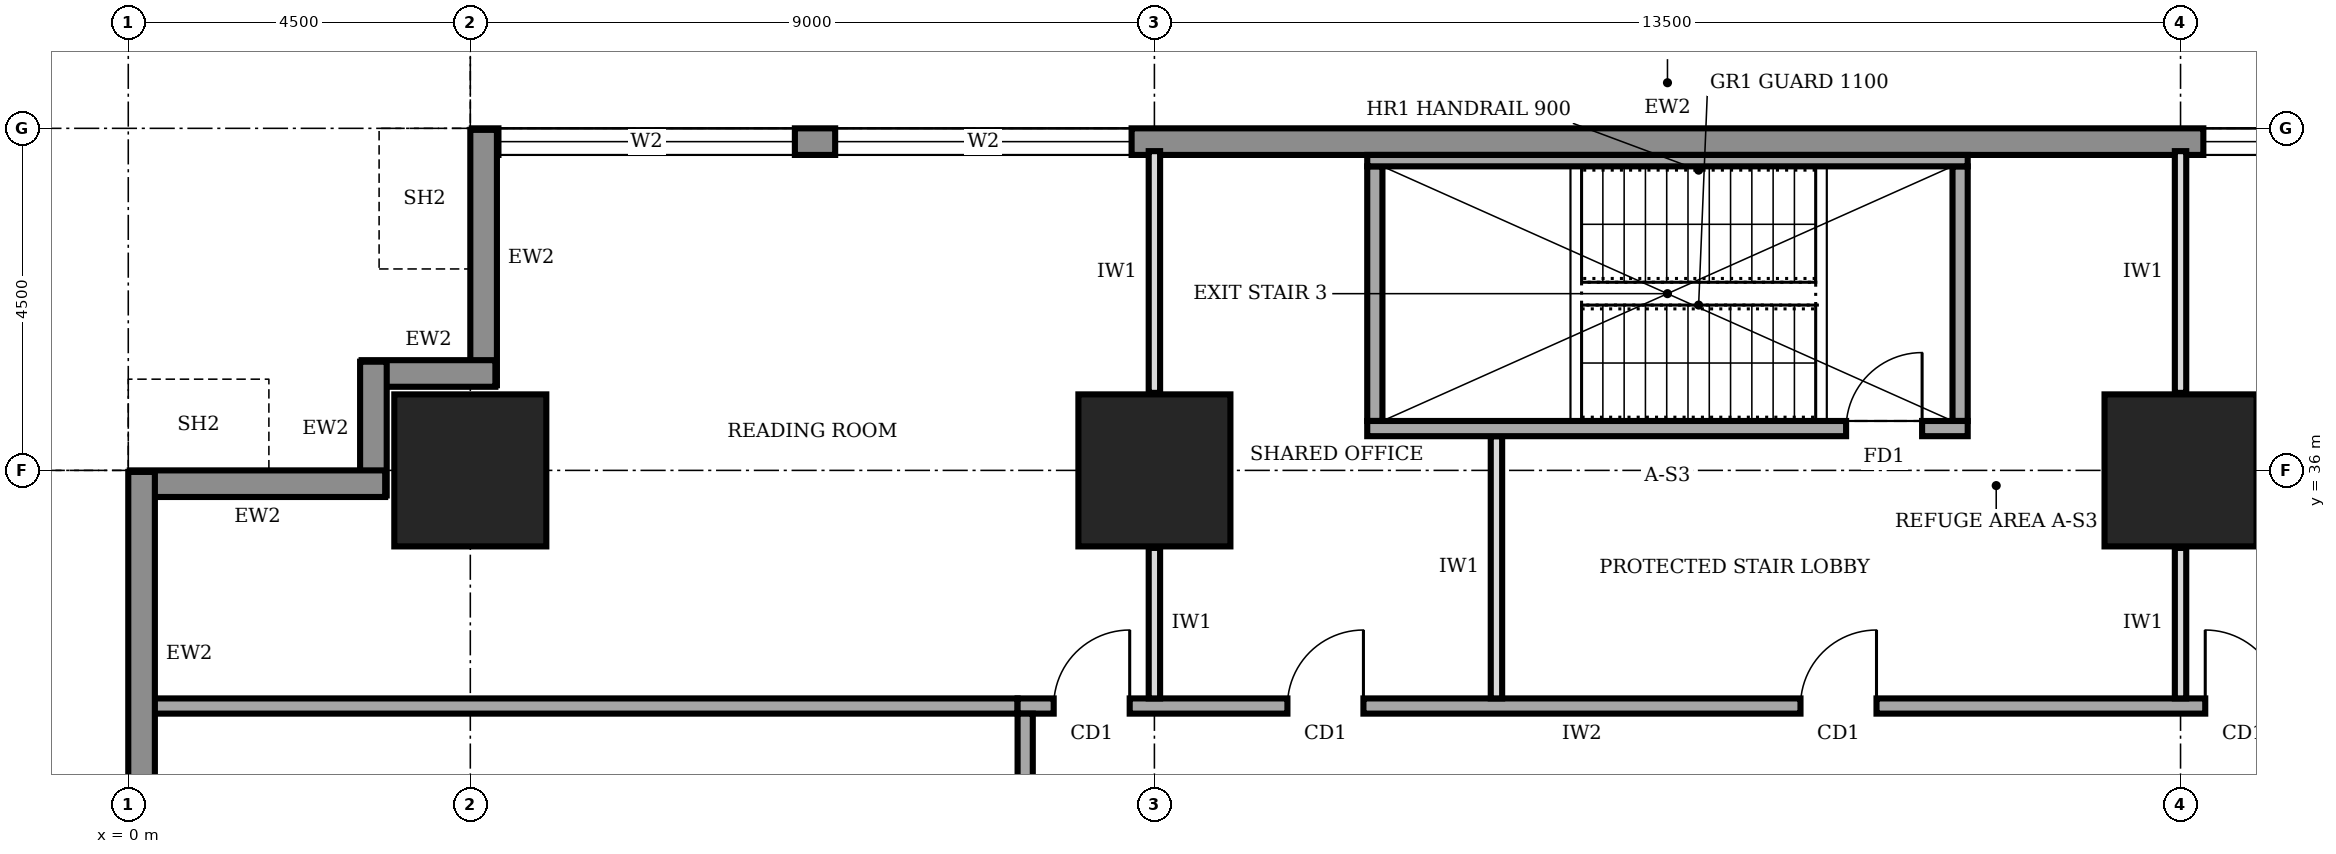
"""IFC4 building model, lengths in metres.
Left out: names, types, materials, properties, quantities, classifications, styles, units other than length and angle.
Written with IfcOpenShell. Run it as: python <this file> out.ifc"""

import sys

from ifc_helpers import new_model, si_unit, direction, frame, frame_2d, origin, origin_2d, place, context, subcontext, project, spatial, rectangle, extrude, element, fill, save


model = new_model("IFC4")
c1 = context("Model", 3, precision=1e-05, world=origin(), true_north=direction((0.0, 1.0)))
c2 = subcontext(c1, "Body", "Model", "MODEL_VIEW")
j1 = project(units=[si_unit("LENGTHUNIT", "METRE"), si_unit("PLANEANGLEUNIT", "RADIAN")], contexts=[c1])
p1 = place(None, origin())
s1 = spatial("IfcSite", under=j1, at=p1, CompositionType="ELEMENT")
p2 = place(p1, origin())
s2 = spatial("IfcBuilding", under=s1, at=p2, CompositionType="ELEMENT")
p3 = place(p2, frame((0.0, 0.0, 73.0)))
s3 = spatial("IfcBuildingStorey", under=s2, at=p3, CompositionType="ELEMENT", Elevation=73.0)
for number, where, z_axis, x_axis in (
    (1, (4.5, 36.0, 0.0), (0.0, 0.0, 1.0), (1.0, 0.0, 0.0)),
    (2, (13.5, 36.0, 0.0), (0.0, 0.0, 1.0), (1.0, 0.0, 0.0)),
    (3, (27.0, 36.0, 0.0), (0.0, 0.0, 1.0), (1.0, 0.0, 0.0)),
):
    element("IfcColumn", number, at=place(p3, frame(where, z_axis=z_axis, x_axis=x_axis)), inside=s3, PredefinedType="COLUMN", context=c2, shape_type="SweptSolid", body=[
        extrude(rectangle(XDim=2.0, YDim=2.0, at=origin_2d()), origin(), (0.0, 0.0, 1.0), 4.0),
    ])
p4 = place(p3, frame((35.98, 40.325, 0.0), z_axis=(0.0, 0.0, 1.0), x_axis=(-1.0, 0.0, 0.0)))
e4 = element("IfcWall", 4, at=p4, inside=s3, PredefinedType="STANDARD", context=c2, shape_type="SweptSolid", body=[
    extrude(rectangle(XDim=31.46, YDim=0.35, at=frame_2d((15.73, 0.0))), origin(), (0.0, 0.0, 1.0), 3.75),
])
p5 = place(p4, frame((27.21, 0.0, 0.6)))
e5 = element("IfcOpeningElement", 5, at=p5, cuts=e4, PredefinedType="OPENING", context=c2, shape_type="SweptSolid", body=[
    extrude(rectangle(XDim=3.9, YDim=2.6, at=frame_2d((1.95, 1.3))), frame((0.0, 0.185, 0.0), z_axis=(0.0, -1.0, 0.0), x_axis=(1.0, 0.0, 0.0)), (0.0, 0.0, 1.0), 0.37),
])
p6 = place(p4, frame((22.78, 0.0, 0.6)))
e6 = element("IfcOpeningElement", 6, at=p6, cuts=e4, PredefinedType="OPENING", context=c2, shape_type="SweptSolid", body=[
    extrude(rectangle(XDim=3.9, YDim=2.6, at=frame_2d((1.95, 1.3))), frame((0.0, 0.185, 0.0), z_axis=(0.0, -1.0, 0.0), x_axis=(1.0, 0.0, 0.0)), (0.0, 0.0, 1.0), 0.37),
])
p7 = place(p4, frame((4.78, 0.0, 0.6)))
e7 = element("IfcOpeningElement", 7, at=p7, cuts=e4, PredefinedType="OPENING", context=c2, shape_type="SweptSolid", body=[
    extrude(rectangle(XDim=3.9, YDim=2.6, at=frame_2d((1.95, 1.3))), frame((0.0, 0.185, 0.0), z_axis=(0.0, -1.0, 0.0), x_axis=(1.0, 0.0, 0.0)), (0.0, 0.0, 1.0), 0.37),
])
p8 = place(p3, frame((4.675, 40.48, 0.0), z_axis=(0.0, 0.0, 1.0), x_axis=(0.0, -1.0, 0.0)))
e8 = element("IfcWall", 8, at=p8, inside=s3, PredefinedType="STANDARD", context=c2, shape_type="SweptSolid", body=[
    extrude(rectangle(XDim=3.36, YDim=0.35, at=frame_2d((1.68, 0.0))), origin(), (0.0, 0.0, 1.0), 2.75),
])
for number, where, z_axis, x_axis in (
    (9, (4.83, 37.275, 0.0), (0.0, 0.0, 1.0), (-1.0, 0.0, 0.0)),
    (10, (3.225, 37.43, 0.0), (0.0, 0.0, 1.0), (0.0, -1.0, 0.0)),
):
    element("IfcWall", number, at=place(p3, frame(where, z_axis=z_axis, x_axis=x_axis)), inside=s3, PredefinedType="STANDARD", context=c2, shape_type="SweptSolid", body=[
        extrude(rectangle(XDim=1.76, YDim=0.35, at=frame_2d((0.88, 0.0))), origin(), (0.0, 0.0, 1.0), 3.75),
    ])
p9 = place(p3, frame((3.38, 35.825, 0.0), z_axis=(0.0, 0.0, 1.0), x_axis=(-1.0, 0.0, 0.0)))
e11 = element("IfcWall", 11, at=p9, inside=s3, PredefinedType="STANDARD", context=c2, shape_type="SweptSolid", body=[
    extrude(rectangle(XDim=3.36, YDim=0.35, at=frame_2d((1.68, 0.0))), origin(), (0.0, 0.0, 1.0), 2.75),
])
p10 = place(p3, frame((0.175, 35.98, 0.0), z_axis=(0.0, 0.0, 1.0), x_axis=(0.0, -1.0, 0.0)))
e12 = element("IfcWall", 12, at=p10, inside=s3, PredefinedType="STANDARD", context=c2, shape_type="SweptSolid", body=[
    extrude(rectangle(XDim=31.46, YDim=0.35, at=frame_2d((15.73, 0.0))), origin(), (0.0, 0.0, 1.0), 3.75),
])
p11 = place(p10, frame((27.21, 0.0, 0.6)))
e13 = element("IfcOpeningElement", 13, at=p11, cuts=e12, PredefinedType="OPENING", context=c2, shape_type="SweptSolid", body=[
    extrude(rectangle(XDim=3.9, YDim=2.6, at=frame_2d((1.95, 1.3))), frame((0.0, 0.185, 0.0), z_axis=(0.0, -1.0, 0.0), x_axis=(1.0, 0.0, 0.0)), (0.0, 0.0, 1.0), 0.37),
])
p12 = place(p10, frame((22.78, 0.0, 0.6)))
e14 = element("IfcOpeningElement", 14, at=p12, cuts=e12, PredefinedType="OPENING", context=c2, shape_type="SweptSolid", body=[
    extrude(rectangle(XDim=3.9, YDim=2.6, at=frame_2d((1.95, 1.3))), frame((0.0, 0.185, 0.0), z_axis=(0.0, -1.0, 0.0), x_axis=(1.0, 0.0, 0.0)), (0.0, 0.0, 1.0), 0.37),
])
p13 = place(p10, frame((18.28, 0.0, 0.6)))
e15 = element("IfcOpeningElement", 15, at=p13, cuts=e12, PredefinedType="OPENING", context=c2, shape_type="SweptSolid", body=[
    extrude(rectangle(XDim=3.9, YDim=2.6, at=frame_2d((1.95, 1.3))), frame((0.0, 0.185, 0.0), z_axis=(0.0, -1.0, 0.0), x_axis=(1.0, 0.0, 0.0)), (0.0, 0.0, 1.0), 0.37),
])
p14 = place(p10, frame((13.78, 0.0, 0.6)))
e16 = element("IfcOpeningElement", 16, at=p14, cuts=e12, PredefinedType="OPENING", context=c2, shape_type="SweptSolid", body=[
    extrude(rectangle(XDim=3.9, YDim=2.6, at=frame_2d((1.95, 1.3))), frame((0.0, 0.185, 0.0), z_axis=(0.0, -1.0, 0.0), x_axis=(1.0, 0.0, 0.0)), (0.0, 0.0, 1.0), 0.37),
])
p15 = place(p10, frame((9.28, 0.0, 0.6)))
e17 = element("IfcOpeningElement", 17, at=p15, cuts=e12, PredefinedType="OPENING", context=c2, shape_type="SweptSolid", body=[
    extrude(rectangle(XDim=3.9, YDim=2.6, at=frame_2d((1.95, 1.3))), frame((0.0, 0.185, 0.0), z_axis=(0.0, -1.0, 0.0), x_axis=(1.0, 0.0, 0.0)), (0.0, 0.0, 1.0), 0.37),
])
p16 = place(p10, frame((4.78, 0.0, 0.6)))
e18 = element("IfcOpeningElement", 18, at=p16, cuts=e12, PredefinedType="OPENING", context=c2, shape_type="SweptSolid", body=[
    extrude(rectangle(XDim=3.9, YDim=2.6, at=frame_2d((1.95, 1.3))), frame((0.0, 0.185, 0.0), z_axis=(0.0, -1.0, 0.0), x_axis=(1.0, 0.0, 0.0)), (0.0, 0.0, 1.0), 0.37),
])
p17 = place(p3, frame((28.6, 32.9, 0.0), z_axis=(0.0, 0.0, 1.0), x_axis=(-1.0, 0.0, 0.0)))
e19 = element("IfcWall", 19, at=p17, inside=s3, PredefinedType="SOLIDWALL", context=c2, shape_type="SweptSolid", body=[
    extrude(rectangle(XDim=16.9, YDim=0.2, at=frame_2d((8.45, 0.0))), origin(), (0.0, 0.0, 1.0), 3.75),
])
p18 = place(p17, frame((15.425, 0.0, 0.0)))
e20 = element("IfcOpeningElement", 20, at=p18, cuts=e19, PredefinedType="OPENING", context=c2, shape_type="SweptSolid", body=[
    extrude(rectangle(XDim=1.0, YDim=2.1, at=frame_2d((0.5, 1.05))), frame((0.0, 0.11, 0.0), z_axis=(0.0, -1.0, 0.0), x_axis=(1.0, 0.0, 0.0)), (0.0, 0.0, 1.0), 0.22),
])
p19 = place(p17, frame((12.35, 0.0, 0.0)))
e21 = element("IfcOpeningElement", 21, at=p19, cuts=e19, PredefinedType="OPENING", context=c2, shape_type="SweptSolid", body=[
    extrude(rectangle(XDim=1.0, YDim=2.1, at=frame_2d((0.5, 1.05))), frame((0.0, 0.11, 0.0), z_axis=(0.0, -1.0, 0.0), x_axis=(1.0, 0.0, 0.0)), (0.0, 0.0, 1.0), 0.22),
])
p20 = place(p17, frame((5.6, 0.0, 0.0)))
e22 = element("IfcOpeningElement", 22, at=p20, cuts=e19, PredefinedType="OPENING", context=c2, shape_type="SweptSolid", body=[
    extrude(rectangle(XDim=1.0, YDim=2.1, at=frame_2d((0.5, 1.05))), frame((0.0, 0.11, 0.0), z_axis=(0.0, -1.0, 0.0), x_axis=(1.0, 0.0, 0.0)), (0.0, 0.0, 1.0), 0.22),
])
p21 = place(p17, frame((0.275, 0.0, 0.0)))
e23 = element("IfcOpeningElement", 23, at=p21, cuts=e19, PredefinedType="OPENING", context=c2, shape_type="SweptSolid", body=[
    extrude(rectangle(XDim=1.0, YDim=2.1, at=frame_2d((0.5, 1.05))), frame((0.0, 0.11, 0.0), z_axis=(0.0, -1.0, 0.0), x_axis=(1.0, 0.0, 0.0)), (0.0, 0.0, 1.0), 0.22),
])
p22 = place(p3, frame((11.8, 32.8, 0.0), z_axis=(0.0, 0.0, 1.0), x_axis=(0.0, -1.0, 0.0)))
e24 = element("IfcWall", 24, at=p22, inside=s3, PredefinedType="SOLIDWALL", context=c2, shape_type="SweptSolid", body=[
    extrude(rectangle(XDim=25.3, YDim=0.2, at=frame_2d((12.65, 0.0))), origin(), (0.0, 0.0, 1.0), 3.75),
])
p23 = place(p22, frame((21.8, 0.0, 0.0)))
e25 = element("IfcOpeningElement", 25, at=p23, cuts=e24, PredefinedType="OPENING", context=c2, shape_type="SweptSolid", body=[
    extrude(rectangle(XDim=1.0, YDim=2.1, at=frame_2d((0.5, 1.05))), frame((0.0, 0.11, 0.0), z_axis=(0.0, -1.0, 0.0), x_axis=(1.0, 0.0, 0.0)), (0.0, 0.0, 1.0), 0.22),
])
p24 = place(p22, frame((17.65, 0.0, 0.0)))
e26 = element("IfcOpeningElement", 26, at=p24, cuts=e24, PredefinedType="OPENING", context=c2, shape_type="SweptSolid", body=[
    extrude(rectangle(XDim=0.9, YDim=2.1, at=frame_2d((0.45, 1.05))), frame((0.0, 0.11, 0.0), z_axis=(0.0, -1.0, 0.0), x_axis=(1.0, 0.0, 0.0)), (0.0, 0.0, 1.0), 0.22),
])
p25 = place(p22, frame((14.45, 0.0, 0.0)))
e27 = element("IfcOpeningElement", 27, at=p25, cuts=e24, PredefinedType="OPENING", context=c2, shape_type="SweptSolid", body=[
    extrude(rectangle(XDim=0.9, YDim=2.1, at=frame_2d((0.45, 1.05))), frame((0.0, 0.11, 0.0), z_axis=(0.0, -1.0, 0.0), x_axis=(1.0, 0.0, 0.0)), (0.0, 0.0, 1.0), 0.22),
])
p26 = place(p22, frame((8.9, 0.0, 0.0)))
e28 = element("IfcOpeningElement", 28, at=p26, cuts=e24, PredefinedType="OPENING", context=c2, shape_type="SweptSolid", body=[
    extrude(rectangle(XDim=0.9, YDim=2.1, at=frame_2d((0.45, 1.05))), frame((0.0, 0.11, 0.0), z_axis=(0.0, -1.0, 0.0), x_axis=(1.0, 0.0, 0.0)), (0.0, 0.0, 1.0), 0.22),
])
p27 = place(p22, frame((6.3, 0.0, 0.0)))
e29 = element("IfcOpeningElement", 29, at=p27, cuts=e24, PredefinedType="OPENING", context=c2, shape_type="SweptSolid", body=[
    extrude(rectangle(XDim=1.0, YDim=2.1, at=frame_2d((0.5, 1.05))), frame((0.0, 0.11, 0.0), z_axis=(0.0, -1.0, 0.0), x_axis=(1.0, 0.0, 0.0)), (0.0, 0.0, 1.0), 0.22),
])
p28 = place(p22, frame((11.4, 0.0, 0.0)))
e30 = element("IfcOpeningElement", 30, at=p28, cuts=e24, PredefinedType="OPENING", context=c2, shape_type="SweptSolid", body=[
    extrude(rectangle(XDim=1.0, YDim=2.1, at=frame_2d((0.5, 1.05))), frame((0.0, 0.11, 0.0), z_axis=(0.0, -1.0, 0.0), x_axis=(1.0, 0.0, 0.0)), (0.0, 0.0, 1.0), 0.22),
])
p29 = place(p22, frame((2.3, 0.0, 0.0)))
e31 = element("IfcOpeningElement", 31, at=p29, cuts=e24, PredefinedType="OPENING", context=c2, shape_type="SweptSolid", body=[
    extrude(rectangle(XDim=1.0, YDim=2.1, at=frame_2d((0.5, 1.05))), frame((0.0, 0.11, 0.0), z_axis=(0.0, -1.0, 0.0), x_axis=(1.0, 0.0, 0.0)), (0.0, 0.0, 1.0), 0.22),
])
p30 = place(p3, frame((0.3, 32.9, 0.0), z_axis=(0.0, 0.0, 1.0), x_axis=(1.0, 0.0, 0.0)))
e32 = element("IfcWall", 32, at=p30, inside=s3, PredefinedType="SOLIDWALL", context=c2, shape_type="SweptSolid", body=[
    extrude(rectangle(XDim=11.4, YDim=0.2, at=frame_2d((5.7, 0.0))), origin(), (0.0, 0.0, 1.0), 3.75),
])
p31 = place(p3, frame((13.5, 33.0, 0.0), z_axis=(0.0, 0.0, 1.0), x_axis=(0.0, 1.0, 0.0)))
e33 = element("IfcWall", 33, at=p31, inside=s3, PredefinedType="PARTITIONING", context=c2, shape_type="SweptSolid", body=[
    extrude(rectangle(XDim=1.98, YDim=0.15, at=frame_2d((0.99, 0.0))), origin(), (0.0, 0.0, 1.0), 3.75),
])
p32 = place(p3, frame((13.5, 37.02, 0.0), z_axis=(0.0, 0.0, 1.0), x_axis=(0.0, 1.0, 0.0)))
e34 = element("IfcWall", 34, at=p32, inside=s3, PredefinedType="PARTITIONING", context=c2, shape_type="SweptSolid", body=[
    extrude(rectangle(XDim=3.18, YDim=0.15, at=frame_2d((1.59, 0.0))), origin(), (0.0, 0.0, 1.0), 2.75),
])
p33 = place(p3, frame((18.0, 33.0, 0.0), z_axis=(0.0, 0.0, 1.0), x_axis=(0.0, 1.0, 0.0)))
e35 = element("IfcWall", 35, at=p33, inside=s3, PredefinedType="PARTITIONING", context=c2, shape_type="SweptSolid", body=[
    extrude(rectangle(XDim=3.45, YDim=0.15, at=frame_2d((1.725, 0.0))), origin(), (0.0, 0.0, 1.0), 3.75),
])
p34 = place(p3, frame((27.0, 33.0, 0.0), z_axis=(0.0, 0.0, 1.0), x_axis=(0.0, 1.0, 0.0)))
e36 = element("IfcWall", 36, at=p34, inside=s3, PredefinedType="PARTITIONING", context=c2, shape_type="SweptSolid", body=[
    extrude(rectangle(XDim=1.98, YDim=0.15, at=frame_2d((0.99, 0.0))), origin(), (0.0, 0.0, 1.0), 3.75),
])
p35 = place(p3, frame((27.0, 37.02, 0.0), z_axis=(0.0, 0.0, 1.0), x_axis=(0.0, 1.0, 0.0)))
e37 = element("IfcWall", 37, at=p35, inside=s3, PredefinedType="PARTITIONING", context=c2, shape_type="SweptSolid", body=[
    extrude(rectangle(XDim=3.18, YDim=0.15, at=frame_2d((1.59, 0.0))), origin(), (0.0, 0.0, 1.0), 2.75),
])
p36 = place(p3, frame((16.3, 36.55, 0.0), z_axis=(0.0, 0.0, 1.0), x_axis=(1.0, 0.0, 0.0)))
e38 = element("IfcWall", 38, at=p36, inside=s3, PredefinedType="SOLIDWALL", context=c2, shape_type="SweptSolid", body=[
    extrude(rectangle(XDim=7.9, YDim=0.2, at=frame_2d((3.95, 0.0))), origin(), (0.0, 0.0, 1.0), 3.75),
])
p37 = place(p36, frame((6.3, 0.0, 0.0)))
e39 = element("IfcOpeningElement", 39, at=p37, cuts=e38, PredefinedType="OPENING", context=c2, shape_type="SweptSolid", body=[
    extrude(rectangle(XDim=1.0, YDim=2.1, at=frame_2d((0.5, 1.05))), frame((0.0, 0.11, 0.0), z_axis=(0.0, -1.0, 0.0), x_axis=(1.0, 0.0, 0.0)), (0.0, 0.0, 1.0), 0.22),
])
p38 = place(p3, frame((16.3, 40.075, 0.0), z_axis=(0.0, 0.0, 1.0), x_axis=(1.0, 0.0, 0.0)))
e40 = element("IfcWall", 40, at=p38, inside=s3, PredefinedType="SOLIDWALL", context=c2, shape_type="SweptSolid", body=[
    extrude(rectangle(XDim=7.9, YDim=0.15, at=frame_2d((3.95, 0.0))), origin(), (0.0, 0.0, 1.0), 3.75),
])
for number, where, z_axis, x_axis in (
    (41, (16.4, 36.65, 0.0), (0.0, 0.0, 1.0), (0.0, 1.0, 0.0)),
    (42, (24.1, 36.65, 0.0), (0.0, 0.0, 1.0), (0.0, 1.0, 0.0)),
):
    element("IfcWall", number, at=place(p3, frame(where, z_axis=z_axis, x_axis=x_axis)), inside=s3, PredefinedType="SOLIDWALL", context=c2, shape_type="SweptSolid", body=[
        extrude(rectangle(XDim=3.35, YDim=0.2, at=frame_2d((1.675, 0.0))), origin(), (0.0, 0.0, 1.0), 3.75),
    ])
p39 = place(p5, origin())
e43 = element("IfcWindow", 43, at=p39, inside=s3, PartitioningType="SINGLE_PANEL", PredefinedType="WINDOW", context=c2, shape_type="SweptSolid", body=[
    extrude(rectangle(XDim=3.9, YDim=2.6, at=frame_2d((1.95, 1.3))), frame((0.0, 0.03, 0.0), z_axis=(0.0, -1.0, 0.0), x_axis=(1.0, 0.0, 0.0)), (0.0, 0.0, 1.0), 0.06),
])
fill(e5, e43)
p40 = place(p6, origin())
e44 = element("IfcWindow", 44, at=p40, inside=s3, PartitioningType="SINGLE_PANEL", PredefinedType="WINDOW", context=c2, shape_type="SweptSolid", body=[
    extrude(rectangle(XDim=3.9, YDim=2.6, at=frame_2d((1.95, 1.3))), frame((0.0, 0.03, 0.0), z_axis=(0.0, -1.0, 0.0), x_axis=(1.0, 0.0, 0.0)), (0.0, 0.0, 1.0), 0.06),
])
fill(e6, e44)
p41 = place(p7, origin())
e45 = element("IfcWindow", 45, at=p41, inside=s3, PartitioningType="SINGLE_PANEL", PredefinedType="WINDOW", context=c2, shape_type="SweptSolid", body=[
    extrude(rectangle(XDim=3.9, YDim=2.6, at=frame_2d((1.95, 1.3))), frame((0.0, 0.03, 0.0), z_axis=(0.0, -1.0, 0.0), x_axis=(1.0, 0.0, 0.0)), (0.0, 0.0, 1.0), 0.06),
])
fill(e7, e45)
p42 = place(p18, frame((1.0, 0.0, 0.0), z_axis=(0.0, 0.0, 1.0), x_axis=(-1.0, 0.0, 0.0)))
e46 = element("IfcDoor", 46, at=p42, inside=s3, OperationType="SINGLE_SWING_RIGHT", PredefinedType="DOOR", context=c2, shape_type="SweptSolid", body=[
    extrude(rectangle(XDim=1.0, YDim=2.1, at=frame_2d((0.5, 1.05))), frame((0.0, 0.025, 0.0), z_axis=(0.0, -1.0, 0.0), x_axis=(1.0, 0.0, 0.0)), (0.0, 0.0, 1.0), 0.05),
])
fill(e20, e46)
p43 = place(p19, frame((1.0, 0.0, 0.0), z_axis=(0.0, 0.0, 1.0), x_axis=(-1.0, 0.0, 0.0)))
e47 = element("IfcDoor", 47, at=p43, inside=s3, OperationType="SINGLE_SWING_RIGHT", PredefinedType="DOOR", context=c2, shape_type="SweptSolid", body=[
    extrude(rectangle(XDim=1.0, YDim=2.1, at=frame_2d((0.5, 1.05))), frame((0.0, 0.025, 0.0), z_axis=(0.0, -1.0, 0.0), x_axis=(1.0, 0.0, 0.0)), (0.0, 0.0, 1.0), 0.05),
])
fill(e21, e47)
p44 = place(p20, frame((1.0, 0.0, 0.0), z_axis=(0.0, 0.0, 1.0), x_axis=(-1.0, 0.0, 0.0)))
e48 = element("IfcDoor", 48, at=p44, inside=s3, OperationType="SINGLE_SWING_RIGHT", PredefinedType="DOOR", context=c2, shape_type="SweptSolid", body=[
    extrude(rectangle(XDim=1.0, YDim=2.1, at=frame_2d((0.5, 1.05))), frame((0.0, 0.025, 0.0), z_axis=(0.0, -1.0, 0.0), x_axis=(1.0, 0.0, 0.0)), (0.0, 0.0, 1.0), 0.05),
])
fill(e22, e48)
p45 = place(p21, frame((1.0, 0.0, 0.0), z_axis=(0.0, 0.0, 1.0), x_axis=(-1.0, 0.0, 0.0)))
e49 = element("IfcDoor", 49, at=p45, inside=s3, OperationType="SINGLE_SWING_LEFT", PredefinedType="DOOR", context=c2, shape_type="SweptSolid", body=[
    extrude(rectangle(XDim=1.0, YDim=2.1, at=frame_2d((0.5, 1.05))), frame((0.0, 0.025, 0.0), z_axis=(0.0, -1.0, 0.0), x_axis=(1.0, 0.0, 0.0)), (0.0, 0.0, 1.0), 0.05),
])
fill(e23, e49)
p46 = place(p37, origin())
e50 = element("IfcDoor", 50, at=p46, inside=s3, OperationType="SINGLE_SWING_RIGHT", PredefinedType="DOOR", context=c2, shape_type="SweptSolid", body=[
    extrude(rectangle(XDim=1.0, YDim=2.1, at=frame_2d((0.5, 1.05))), frame((0.0, 0.025, 0.0), z_axis=(0.0, -1.0, 0.0), x_axis=(1.0, 0.0, 0.0)), (0.0, 0.0, 1.0), 0.05),
])
fill(e39, e50)
save(model, sys.argv[1])
